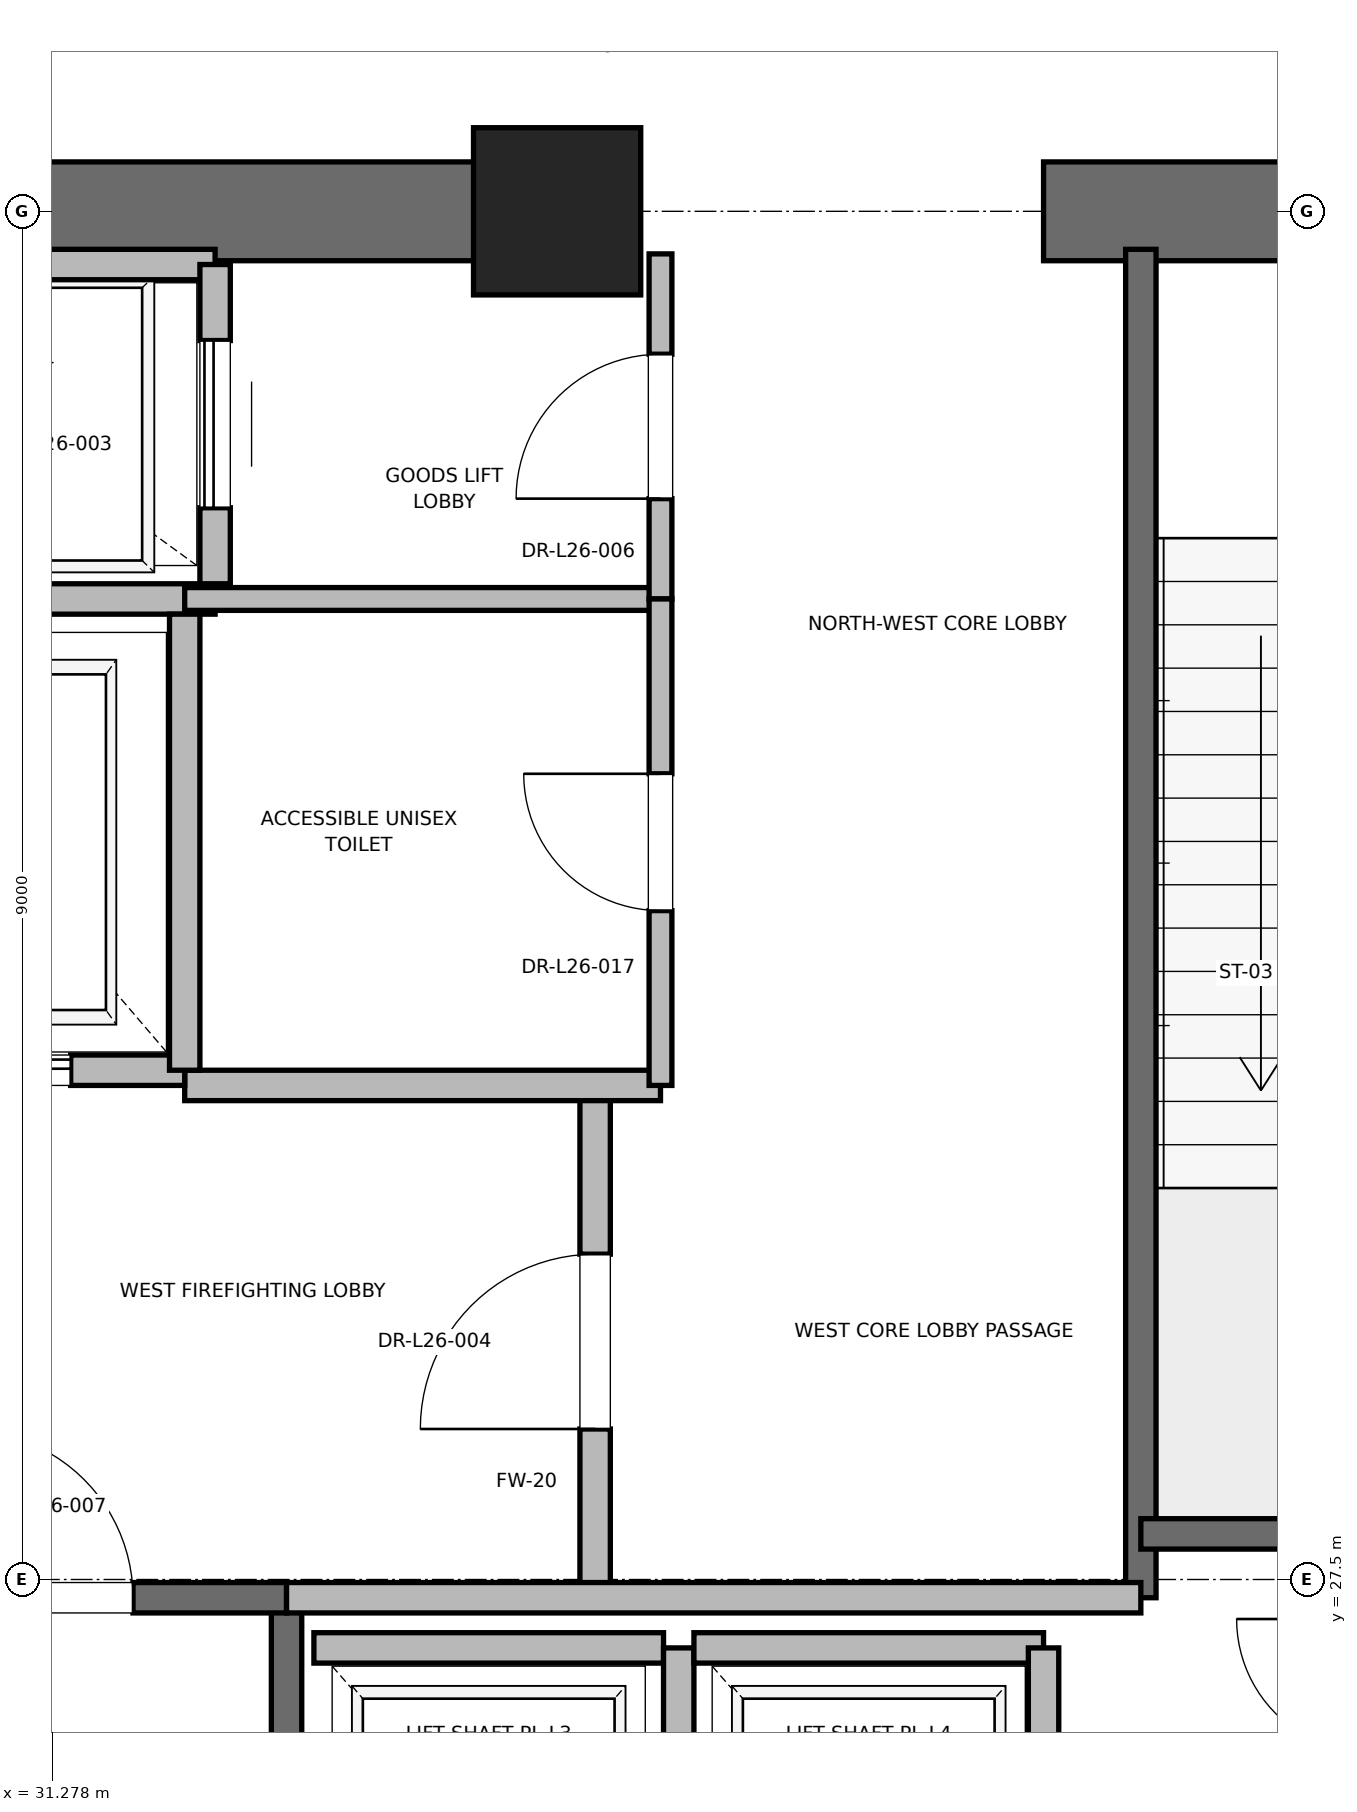
"""IFC4 building model, lengths in metres.
Left out: names, types, materials, properties, quantities, classifications, styles, units other than length and angle.
Written with IfcOpenShell. Run it as: python <this file> out.ifc"""

import sys

from ifc_helpers import new_model, si_unit, direction, frame, frame_2d, origin, origin_2d, place, context, subcontext, project, spatial, rectangle, extrude, element, fill, save


model = new_model("IFC4")
c1 = context("Model", 3, precision=1e-05, world=origin(), true_north=direction((0.0, 1.0)))
c2 = subcontext(c1, "Body", "Model", "MODEL_VIEW")
j1 = project(units=[si_unit("LENGTHUNIT", "METRE"), si_unit("PLANEANGLEUNIT", "RADIAN")], contexts=[c1])
p1 = place(None, origin())
s1 = spatial("IfcSite", under=j1, at=p1, CompositionType="ELEMENT")
p2 = place(p1, origin())
s2 = spatial("IfcBuilding", under=s1, at=p2, CompositionType="ELEMENT")
p3 = place(p2, frame((0.0, 0.0, 113.0)))
s3 = spatial("IfcBuildingStorey", under=s2, at=p3, CompositionType="ELEMENT", Elevation=113.0)
p4 = place(p3, frame((34.6, 36.5, 0.0), z_axis=(0.0, 0.0, 1.0), x_axis=(1.0, 0.0, 0.0)))
e1 = element("IfcColumn", 1, at=p4, inside=s3, PredefinedType="PILASTER", context=c2, shape_type="SweptSolid", body=[
    extrude(rectangle(XDim=1.1, YDim=1.1, at=origin_2d()), origin(), (0.0, 0.0, 1.0), 5.4),
])
p5 = place(p3, frame((29.0, 36.5, 0.0), z_axis=(0.0, 0.0, 1.0), x_axis=(1.0, 0.0, 0.0)))
e2 = element("IfcWall", 2, at=p5, inside=s3, PredefinedType="SHEAR", context=c2, shape_type="SweptSolid", body=[
    extrude(rectangle(XDim=5.8, YDim=0.65, at=frame_2d((2.9, 0.0))), origin(), (0.0, 0.0, 1.0), 5.1),
])
p6 = place(p3, frame((37.8, 36.5, 0.0), z_axis=(0.0, 0.0, 1.0), x_axis=(1.0, 0.0, 0.0)))
e3 = element("IfcWall", 3, at=p6, inside=s3, PredefinedType="SHEAR", context=c2, shape_type="SweptSolid", body=[
    extrude(rectangle(XDim=4.4, YDim=0.65, at=frame_2d((2.2, 0.0))), origin(), (0.0, 0.0, 1.0), 5.1),
])
p7 = place(p6, frame((1.65, 0.0, 0.0)))
e4 = element("IfcOpeningElement", 4, at=p7, cuts=e3, PredefinedType="OPENING", context=c2, shape_type="SweptSolid", body=[
    extrude(rectangle(XDim=1.1, YDim=2.15, at=frame_2d((0.55, 1.075))), frame((0.0, 0.325, 0.0), z_axis=(0.0, -1.0, 0.0), x_axis=(1.0, 0.0, 0.0)), (0.0, 0.0, 1.0), 0.65),
])
p8 = place(p3, frame((32.82, 18.6, 0.0), z_axis=(0.0, 0.0, 1.0), x_axis=(0.0, 1.0, 0.0)))
e5 = element("IfcWall", 5, at=p8, inside=s3, PredefinedType="SOLIDWALL", context=c2, shape_type="SweptSolid", body=[
    extrude(rectangle(XDim=8.78, YDim=0.2, at=frame_2d((4.39, 0.0))), origin(), (0.0, 0.0, 1.0), 5.1),
])
p9 = place(p3, frame((29.7, 27.38, 0.0), z_axis=(0.0, 0.0, 1.0), x_axis=(1.0, 0.0, 0.0)))
e6 = element("IfcWall", 6, at=p9, inside=s3, PredefinedType="SOLIDWALL", context=c2, shape_type="SweptSolid", body=[
    extrude(rectangle(XDim=3.12, YDim=0.2, at=frame_2d((1.56, 0.0))), origin(), (0.0, 0.0, 1.0), 5.1),
])
p10 = place(p9, frame((1.01, 0.0, 0.0)))
e7 = element("IfcOpeningElement", 7, at=p10, cuts=e6, PredefinedType="OPENING", context=c2, shape_type="SweptSolid", body=[
    extrude(rectangle(XDim=1.1, YDim=2.15, at=frame_2d((0.55, 1.075))), frame((0.0, 0.1, 0.0), z_axis=(0.0, -1.0, 0.0), x_axis=(1.0, 0.0, 0.0)), (0.0, 0.0, 1.0), 0.2),
])
p11 = place(p3, frame((38.44, 27.38, 0.0), z_axis=(0.0, 0.0, 1.0), x_axis=(0.0, 1.0, 0.0)))
e8 = element("IfcWall", 8, at=p11, inside=s3, PredefinedType="SOLIDWALL", context=c2, shape_type="SweptSolid", body=[
    extrude(rectangle(XDim=8.87, YDim=0.2, at=frame_2d((4.435, 0.0))), origin(), (0.0, 0.0, 1.0), 5.1),
])
p12 = place(p3, frame((38.44, 27.8, 0.0), z_axis=(0.0, 0.0, 1.0), x_axis=(1.0, 0.0, 0.0)))
e9 = element("IfcWall", 9, at=p12, inside=s3, PredefinedType="SOLIDWALL", context=c2, shape_type="SweptSolid", body=[
    extrude(rectangle(XDim=3.32, YDim=0.2, at=frame_2d((1.66, 0.0))), origin(), (0.0, 0.0, 1.0), 5.1),
])
p13 = place(p3, frame((34.85, 27.38, 0.0), z_axis=(0.0, 0.0, 1.0), x_axis=(0.0, 1.0, 0.0)))
e10 = element("IfcWall", 10, at=p13, inside=s3, PredefinedType="PARTITIONING", context=c2, shape_type="SweptSolid", body=[
    extrude(rectangle(XDim=3.37, YDim=0.2, at=frame_2d((1.685, 0.0))), origin(), (0.0, 0.0, 1.0), 5.1),
])
p14 = place(p13, frame((1.11, 0.0, 0.0)))
e11 = element("IfcOpeningElement", 11, at=p14, cuts=e10, PredefinedType="OPENING", context=c2, shape_type="SweptSolid", body=[
    extrude(rectangle(XDim=1.15, YDim=2.2, at=frame_2d((0.575, 1.1))), frame((0.0, 0.1, 0.0), z_axis=(0.0, -1.0, 0.0), x_axis=(1.0, 0.0, 0.0)), (0.0, 0.0, 1.0), 0.2),
])
p15 = place(p3, frame((32.82, 27.38, 0.0), z_axis=(0.0, 0.0, 1.0), x_axis=(1.0, 0.0, 0.0)))
e12 = element("IfcWall", 12, at=p15, inside=s3, PredefinedType="PARTITIONING", context=c2, shape_type="SweptSolid", body=[
    extrude(rectangle(XDim=5.62, YDim=0.2, at=frame_2d((2.81, 0.0))), origin(), (0.0, 0.0, 1.0), 5.1),
])
p16 = place(p3, frame((32.15, 30.75, 0.0), z_axis=(0.0, 0.0, 1.0), x_axis=(1.0, 0.0, 0.0)))
e13 = element("IfcWall", 13, at=p16, inside=s3, PredefinedType="PARTITIONING", context=c2, shape_type="SweptSolid", body=[
    extrude(rectangle(XDim=3.13, YDim=0.2, at=frame_2d((1.565, 0.0))), origin(), (0.0, 0.0, 1.0), 5.1),
])
p17 = place(p3, frame((29.55, 30.85, 0.0), z_axis=(0.0, 0.0, 1.0), x_axis=(1.0, 0.0, 0.0)))
e14 = element("IfcWall", 14, at=p17, inside=s3, PredefinedType="SOLIDWALL", context=c2, shape_type="SweptSolid", body=[
    extrude(rectangle(XDim=2.6, YDim=0.2, at=frame_2d((1.3, 0.0))), origin(), (0.0, 0.0, 1.0), 3.88),
])
p18 = place(p17, frame((0.75, 0.0, 0.0)))
e15 = element("IfcOpeningElement", 15, at=p18, cuts=e14, PredefinedType="OPENING", context=c2, shape_type="SweptSolid", body=[
    extrude(rectangle(XDim=1.1, YDim=2.2, at=frame_2d((0.55, 1.1))), frame((0.0, 0.1, 0.0), z_axis=(0.0, -1.0, 0.0), x_axis=(1.0, 0.0, 0.0)), (0.0, 0.0, 1.0), 0.2),
])
p19 = place(p3, frame((29.55, 33.95, 0.0), z_axis=(0.0, 0.0, 1.0), x_axis=(1.0, 0.0, 0.0)))
e16 = element("IfcWall", 16, at=p19, inside=s3, PredefinedType="SOLIDWALL", context=c2, shape_type="SweptSolid", body=[
    extrude(rectangle(XDim=2.8, YDim=0.2, at=frame_2d((1.4, 0.0))), origin(), (0.0, 0.0, 1.0), 5.1),
])
p20 = place(p3, frame((32.15, 30.85, 0.0), z_axis=(0.0, 0.0, 1.0), x_axis=(0.0, 1.0, 0.0)))
e17 = element("IfcWall", 17, at=p20, inside=s3, PredefinedType="SOLIDWALL", context=c2, shape_type="SweptSolid", body=[
    extrude(rectangle(XDim=3.0, YDim=0.2, at=frame_2d((1.5, 0.0))), origin(), (0.0, 0.0, 1.0), 5.1),
])
p21 = place(p3, frame((32.35, 36.15, 0.0), z_axis=(0.0, 0.0, 1.0), x_axis=(-1.0, 0.0, 0.0)))
e18 = element("IfcWall", 18, at=p21, inside=s3, PredefinedType="SOLIDWALL", context=c2, shape_type="SweptSolid", body=[
    extrude(rectangle(XDim=2.8, YDim=0.2, at=frame_2d((1.4, 0.0))), origin(), (0.0, 0.0, 1.0), 4.153),
])
p22 = place(p3, frame((32.35, 34.05, 0.0), z_axis=(0.0, 0.0, 1.0), x_axis=(0.0, 1.0, 0.0)))
e19 = element("IfcWall", 19, at=p22, inside=s3, PredefinedType="SOLIDWALL", context=c2, shape_type="SweptSolid", body=[
    extrude(rectangle(XDim=2.1, YDim=0.2, at=frame_2d((1.05, 0.0))), origin(), (0.0, 0.0, 1.0), 5.1),
])
p23 = place(p22, frame((0.5, 0.0, 0.0)))
e20 = element("IfcOpeningElement", 20, at=p23, cuts=e19, PredefinedType="OPENING", context=c2, shape_type="SweptSolid", body=[
    extrude(rectangle(XDim=1.1, YDim=2.2, at=frame_2d((0.55, 1.1))), frame((0.0, 0.1, 0.0), z_axis=(0.0, -1.0, 0.0), x_axis=(1.0, 0.0, 0.0)), (0.0, 0.0, 1.0), 0.2),
])
p24 = place(p3, frame((35.3, 27.05, 0.0), z_axis=(0.0, 0.0, 1.0), x_axis=(-1.0, 0.0, 0.0)))
e21 = element("IfcWall", 21, at=p24, inside=s3, PredefinedType="SOLIDWALL", context=c2, shape_type="SweptSolid", body=[
    extrude(rectangle(XDim=2.3, YDim=0.2, at=frame_2d((1.15, 0.0))), origin(), (0.0, 0.0, 1.0), 5.1),
])
p25 = place(p3, frame((35.4, 24.45, 0.0), z_axis=(0.0, 0.0, 1.0), x_axis=(0.0, 1.0, 0.0)))
e22 = element("IfcWall", 22, at=p25, inside=s3, PredefinedType="SOLIDWALL", context=c2, shape_type="SweptSolid", body=[
    extrude(rectangle(XDim=2.6, YDim=0.2, at=frame_2d((1.3, 0.0))), origin(), (0.0, 0.0, 1.0), 5.1),
])
p26 = place(p3, frame((37.8, 27.05, 0.0), z_axis=(0.0, 0.0, 1.0), x_axis=(-1.0, 0.0, 0.0)))
e23 = element("IfcWall", 23, at=p26, inside=s3, PredefinedType="SOLIDWALL", context=c2, shape_type="SweptSolid", body=[
    extrude(rectangle(XDim=2.3, YDim=0.2, at=frame_2d((1.15, 0.0))), origin(), (0.0, 0.0, 1.0), 5.1),
])
p27 = place(p3, frame((37.8, 24.45, 0.0), z_axis=(0.0, 0.0, 1.0), x_axis=(0.0, 1.0, 0.0)))
e24 = element("IfcWall", 24, at=p27, inside=s3, PredefinedType="SOLIDWALL", context=c2, shape_type="SweptSolid", body=[
    extrude(rectangle(XDim=2.6, YDim=0.2, at=frame_2d((1.3, 0.0))), origin(), (0.0, 0.0, 1.0), 5.1),
])
p28 = place(p3, frame((32.15, 33.95, 0.0), z_axis=(0.0, 0.0, 1.0), x_axis=(1.0, 0.0, 0.0)))
e25 = element("IfcWall", 25, at=p28, inside=s3, PredefinedType="PARTITIONING", context=c2, shape_type="SweptSolid", body=[
    extrude(rectangle(XDim=3.13, YDim=0.15, at=frame_2d((1.565, 0.0))), origin(), (0.0, 0.0, 1.0), 2.85),
])
p29 = place(p3, frame((35.28, 33.95, 0.0), z_axis=(0.0, 0.0, 1.0), x_axis=(0.0, 1.0, 0.0)))
e26 = element("IfcWall", 26, at=p29, inside=s3, PredefinedType="PARTITIONING", context=c2, shape_type="SweptSolid", body=[
    extrude(rectangle(XDim=2.27, YDim=0.15, at=frame_2d((1.135, 0.0))), origin(), (0.0, 0.0, 1.0), 2.85),
])
p30 = place(p29, frame((0.66, 0.0, 0.0)))
e27 = element("IfcOpeningElement", 27, at=p30, cuts=e26, PredefinedType="OPENING", context=c2, shape_type="SweptSolid", body=[
    extrude(rectangle(XDim=0.95, YDim=2.15, at=frame_2d((0.475, 1.075))), frame((0.0, 0.075, 0.0), z_axis=(0.0, -1.0, 0.0), x_axis=(1.0, 0.0, 0.0)), (0.0, 0.0, 1.0), 0.15),
])
p31 = place(p3, frame((35.28, 30.75, 0.0), z_axis=(0.0, 0.0, 1.0), x_axis=(0.0, 1.0, 0.0)))
e28 = element("IfcWall", 28, at=p31, inside=s3, PredefinedType="PARTITIONING", context=c2, shape_type="SweptSolid", body=[
    extrude(rectangle(XDim=3.2, YDim=0.15, at=frame_2d((1.6, 0.0))), origin(), (0.0, 0.0, 1.0), 2.85),
])
p32 = place(p31, frame((1.15, 0.0, 0.0)))
e29 = element("IfcOpeningElement", 29, at=p32, cuts=e28, PredefinedType="OPENING", context=c2, shape_type="SweptSolid", body=[
    extrude(rectangle(XDim=0.9, YDim=2.1, at=frame_2d((0.45, 1.05))), frame((0.0, 0.075, 0.0), z_axis=(0.0, -1.0, 0.0), x_axis=(1.0, 0.0, 0.0)), (0.0, 0.0, 1.0), 0.15),
])
p33 = place(p10, origin())
e30 = element("IfcDoor", 30, at=p33, inside=s3, OperationType="SINGLE_SWING_LEFT", PredefinedType="DOOR", context=c2, shape_type="SweptSolid", body=[
    extrude(rectangle(XDim=1.1, YDim=2.15, at=frame_2d((0.55, 1.075))), frame((0.0, 0.025, 0.0), z_axis=(0.0, -1.0, 0.0), x_axis=(1.0, 0.0, 0.0)), (0.0, 0.0, 1.0), 0.05),
])
fill(e7, e30)
p34 = place(p14, origin())
e31 = element("IfcDoor", 31, at=p34, inside=s3, OperationType="SINGLE_SWING_LEFT", PredefinedType="DOOR", context=c2, shape_type="SweptSolid", body=[
    extrude(rectangle(XDim=1.15, YDim=2.2, at=frame_2d((0.575, 1.1))), frame((0.0, 0.025, 0.0), z_axis=(0.0, -1.0, 0.0), x_axis=(1.0, 0.0, 0.0)), (0.0, 0.0, 1.0), 0.05),
])
fill(e11, e31)
p35 = place(p18, origin())
e32 = element("IfcDoor", 32, at=p35, inside=s3, OperationType="SLIDING_TO_RIGHT", PredefinedType="DOOR", context=c2, shape_type="SweptSolid", body=[
    extrude(rectangle(XDim=1.1, YDim=2.2, at=frame_2d((0.55, 1.1))), frame((0.0, 0.025, 0.0), z_axis=(0.0, -1.0, 0.0), x_axis=(1.0, 0.0, 0.0)), (0.0, 0.0, 1.0), 0.05),
])
fill(e15, e32)
p36 = place(p23, origin())
e33 = element("IfcDoor", 33, at=p36, inside=s3, OperationType="SLIDING_TO_RIGHT", PredefinedType="DOOR", context=c2, shape_type="SweptSolid", body=[
    extrude(rectangle(XDim=1.1, YDim=2.2, at=frame_2d((0.55, 1.1))), frame((0.0, 0.025, 0.0), z_axis=(0.0, -1.0, 0.0), x_axis=(1.0, 0.0, 0.0)), (0.0, 0.0, 1.0), 0.05),
])
fill(e20, e33)
p37 = place(p30, origin())
e34 = element("IfcDoor", 34, at=p37, inside=s3, OperationType="SINGLE_SWING_LEFT", PredefinedType="DOOR", context=c2, shape_type="SweptSolid", body=[
    extrude(rectangle(XDim=0.95, YDim=2.15, at=frame_2d((0.475, 1.075))), frame((0.0, 0.025, 0.0), z_axis=(0.0, -1.0, 0.0), x_axis=(1.0, 0.0, 0.0)), (0.0, 0.0, 1.0), 0.05),
])
fill(e27, e34)
p38 = place(p32, origin())
e35 = element("IfcDoor", 35, at=p38, inside=s3, OperationType="SINGLE_SWING_RIGHT", PredefinedType="DOOR", context=c2, shape_type="SweptSolid", body=[
    extrude(rectangle(XDim=0.9, YDim=2.1, at=frame_2d((0.45, 1.05))), frame((0.0, 0.025, 0.0), z_axis=(0.0, -1.0, 0.0), x_axis=(1.0, 0.0, 0.0)), (0.0, 0.0, 1.0), 0.05),
])
fill(e29, e35)
save(model, sys.argv[1])
